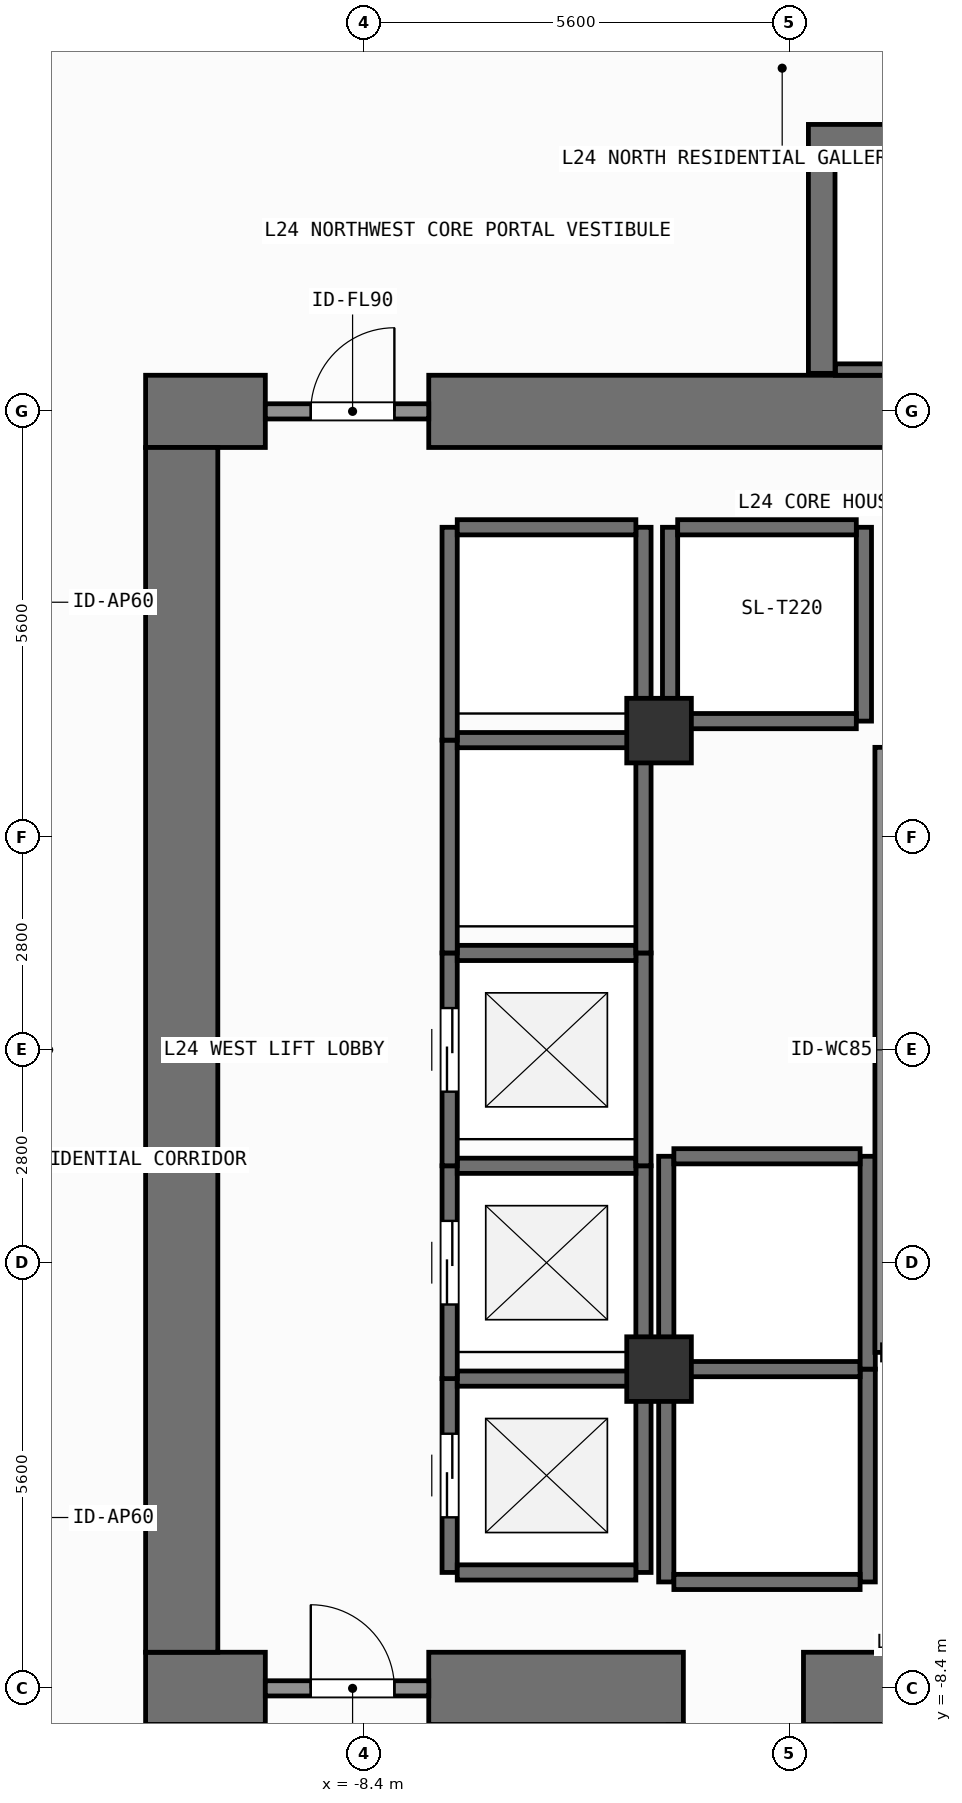
"""IFC4 building model, lengths in metres.
Left out: names, types, materials, properties, quantities, classifications, styles, units other than length and angle.
Written with IfcOpenShell. Run it as: python <this file> out.ifc"""

import sys

from ifc_helpers import new_model, si_unit, direction, frame, frame_2d, origin, origin_2d, place, context, subcontext, project, spatial, rectangle, extrude, element, fill, save


model = new_model("IFC4")
c1 = context("Model", 3, precision=1e-05, world=origin(), true_north=direction((0.0, 1.0)))
c2 = subcontext(c1, "Body", "Model", "MODEL_VIEW")
j1 = project(units=[si_unit("LENGTHUNIT", "METRE"), si_unit("PLANEANGLEUNIT", "RADIAN")], contexts=[c1])
p1 = place(None, origin())
s1 = spatial("IfcSite", under=j1, at=p1, CompositionType="ELEMENT")
p2 = place(p1, origin())
s2 = spatial("IfcBuilding", under=s1, at=p2, CompositionType="ELEMENT")
p3 = place(p2, frame((0.0, 0.0, 96.9)))
s3 = spatial("IfcBuildingStorey", under=s2, at=p3, CompositionType="ELEMENT", Elevation=96.9)
p4 = place(p3, frame((-11.275, -8.4, 0.0), z_axis=(0.0, 0.0, 1.0), x_axis=(1.0, 0.0, 0.0)))
e1 = element("IfcWall", 1, at=p4, inside=s3, PredefinedType="SHEAR", context=c2, shape_type="SweptSolid", body=[
    extrude(rectangle(XDim=1.575, YDim=0.95, at=frame_2d((0.788, 0.0))), origin(), (0.0, 0.0, 1.0), 3.9),
])
p5 = place(p3, frame((-7.55, -8.4, 0.0), z_axis=(0.0, 0.0, 1.0), x_axis=(1.0, 0.0, 0.0)))
e2 = element("IfcWall", 2, at=p5, inside=s3, PredefinedType="SHEAR", context=c2, shape_type="SweptSolid", body=[
    extrude(rectangle(XDim=3.35, YDim=0.95, at=frame_2d((1.675, 0.0))), origin(), (0.0, 0.0, 1.0), 3.9),
])
p6 = place(p3, frame((-2.62, -8.4, 0.0), z_axis=(0.0, 0.0, 1.0), x_axis=(1.0, 0.0, 0.0)))
e3 = element("IfcWall", 3, at=p6, inside=s3, PredefinedType="SHEAR", context=c2, shape_type="SweptSolid", body=[
    extrude(rectangle(XDim=7.27, YDim=0.95, at=frame_2d((3.635, 0.0))), origin(), (0.0, 0.0, 1.0), 3.9),
])
p7 = place(p3, frame((-11.275, 8.4, 0.0), z_axis=(0.0, 0.0, 1.0), x_axis=(1.0, 0.0, 0.0)))
e4 = element("IfcWall", 4, at=p7, inside=s3, PredefinedType="SHEAR", context=c2, shape_type="SweptSolid", body=[
    extrude(rectangle(XDim=1.575, YDim=0.95, at=frame_2d((0.788, 0.0))), origin(), (0.0, 0.0, 1.0), 3.9),
])
p8 = place(p3, frame((-7.55, 8.4, 0.0), z_axis=(0.0, 0.0, 1.0), x_axis=(1.0, 0.0, 0.0)))
e5 = element("IfcWall", 5, at=p8, inside=s3, PredefinedType="SHEAR", context=c2, shape_type="SweptSolid", body=[
    extrude(rectangle(XDim=16.425, YDim=0.95, at=frame_2d((8.212, 0.0))), origin(), (0.0, 0.0, 1.0), 3.9),
])
p9 = place(p3, frame((-10.8, -7.925, 0.0), z_axis=(0.0, 0.0, 1.0), x_axis=(0.0, 1.0, 0.0)))
e6 = element("IfcWall", 6, at=p9, inside=s3, PredefinedType="SHEAR", context=c2, shape_type="SweptSolid", body=[
    extrude(rectangle(XDim=15.85, YDim=0.95, at=frame_2d((7.925, 0.0))), origin(), (0.0, 0.0, 1.0), 3.9),
])
p10 = place(p3, frame((-2.555, 12.0, 0.0), z_axis=(0.0, 0.0, 1.0), x_axis=(1.0, 0.0, 0.0)))
e7 = element("IfcWall", 7, at=p10, inside=s3, PredefinedType="SHEAR", context=c2, shape_type="SweptSolid", body=[
    extrude(rectangle(XDim=7.31, YDim=0.35, at=frame_2d((3.655, 0.0))), origin(), (0.0, 0.0, 1.0), 3.9),
])
p11 = place(p3, frame((-2.2, 8.95, 0.0), z_axis=(0.0, 0.0, 1.0), x_axis=(1.0, 0.0, 0.0)))
e8 = element("IfcWall", 8, at=p11, inside=s3, PredefinedType="SHEAR", context=c2, shape_type="SweptSolid", body=[
    extrude(rectangle(XDim=6.6, YDim=0.15, at=frame_2d((3.3, 0.0))), origin(), (0.0, 0.0, 1.0), 3.9),
])
p12 = place(p3, frame((-2.38, 8.9, 0.0), z_axis=(0.0, 0.0, 1.0), x_axis=(0.0, 1.0, 0.0)))
e9 = element("IfcWall", 9, at=p12, inside=s3, PredefinedType="SHEAR", context=c2, shape_type="SweptSolid", body=[
    extrude(rectangle(XDim=2.925, YDim=0.35, at=frame_2d((1.462, 0.0))), origin(), (0.0, 0.0, 1.0), 3.9),
])
for number, where, z_axis, x_axis in (
    (10, (-4.52, -4.2, 0.0), (0.0, 0.0, 1.0), (1.0, 0.0, 0.0)),
    (11, (-4.52, 4.2, 0.0), (0.0, 0.0, 1.0), (1.0, 0.0, 0.0)),
):
    element("IfcColumn", number, at=place(p3, frame(where, z_axis=z_axis, x_axis=x_axis)), inside=s3, PredefinedType="COLUMN", context=c2, shape_type="SweptSolid", body=[
        extrude(rectangle(XDim=0.85, YDim=0.85, at=origin_2d()), origin(), (0.0, 0.0, 1.0), 3.9),
    ])
p13 = place(p3, frame((-7.275, -6.875, 0.0), z_axis=(0.0, 0.0, 1.0), x_axis=(0.0, 1.0, 0.0)))
e12 = element("IfcWall", 12, at=p13, inside=s3, PredefinedType="SHEAR", context=c2, shape_type="SweptSolid", body=[
    extrude(rectangle(XDim=2.55, YDim=0.2, at=frame_2d((1.275, 0.0))), origin(), (0.0, 0.0, 1.0), 3.68),
])
p14 = place(p13, frame((0.725, 0.0, 0.0)))
e13 = element("IfcOpeningElement", 13, at=p14, cuts=e12, PredefinedType="OPENING", context=c2, shape_type="SweptSolid", body=[
    extrude(rectangle(XDim=1.1, YDim=2.2, at=frame_2d((0.55, 1.1))), frame((0.0, 0.11, 0.0), z_axis=(0.0, -1.0, 0.0), x_axis=(1.0, 0.0, 0.0)), (0.0, 0.0, 1.0), 0.22),
])
p15 = place(p3, frame((-4.725, -6.875, 0.0), z_axis=(0.0, 0.0, 1.0), x_axis=(0.0, 1.0, 0.0)))
e14 = element("IfcWall", 14, at=p15, inside=s3, PredefinedType="SHEAR", context=c2, shape_type="SweptSolid", body=[
    extrude(rectangle(XDim=2.55, YDim=0.2, at=frame_2d((1.275, 0.0))), origin(), (0.0, 0.0, 1.0), 3.68),
])
for number, where, z_axis, x_axis in (
    (15, (-7.175, -6.875, 0.0), (0.0, 0.0, 1.0), (1.0, 0.0, 0.0)),
    (16, (-7.175, -4.325, 0.0), (0.0, 0.0, 1.0), (1.0, 0.0, 0.0)),
):
    element("IfcWall", number, at=place(p3, frame(where, z_axis=z_axis, x_axis=x_axis)), inside=s3, PredefinedType="SHEAR", context=c2, shape_type="SweptSolid", body=[
        extrude(rectangle(XDim=2.35, YDim=0.2, at=frame_2d((1.175, 0.0))), origin(), (0.0, 0.0, 1.0), 3.68),
    ])
p16 = place(p3, frame((-7.275, -4.325, 0.0), z_axis=(0.0, 0.0, 1.0), x_axis=(0.0, 1.0, 0.0)))
e17 = element("IfcWall", 17, at=p16, inside=s3, PredefinedType="SHEAR", context=c2, shape_type="SweptSolid", body=[
    extrude(rectangle(XDim=2.8, YDim=0.2, at=frame_2d((1.4, 0.0))), origin(), (0.0, 0.0, 1.0), 3.68),
])
p17 = place(p16, frame((0.975, 0.0, 0.0)))
e18 = element("IfcOpeningElement", 18, at=p17, cuts=e17, PredefinedType="OPENING", context=c2, shape_type="SweptSolid", body=[
    extrude(rectangle(XDim=1.1, YDim=2.2, at=frame_2d((0.55, 1.1))), frame((0.0, 0.11, 0.0), z_axis=(0.0, -1.0, 0.0), x_axis=(1.0, 0.0, 0.0)), (0.0, 0.0, 1.0), 0.22),
])
p18 = place(p3, frame((-4.725, -4.325, 0.0), z_axis=(0.0, 0.0, 1.0), x_axis=(0.0, 1.0, 0.0)))
e19 = element("IfcWall", 19, at=p18, inside=s3, PredefinedType="SHEAR", context=c2, shape_type="SweptSolid", body=[
    extrude(rectangle(XDim=2.8, YDim=0.2, at=frame_2d((1.4, 0.0))), origin(), (0.0, 0.0, 1.0), 3.68),
])
p19 = place(p3, frame((-7.175, -1.525, 0.0), z_axis=(0.0, 0.0, 1.0), x_axis=(1.0, 0.0, 0.0)))
e20 = element("IfcWall", 20, at=p19, inside=s3, PredefinedType="SHEAR", context=c2, shape_type="SweptSolid", body=[
    extrude(rectangle(XDim=2.35, YDim=0.2, at=frame_2d((1.175, 0.0))), origin(), (0.0, 0.0, 1.0), 3.68),
])
p20 = place(p3, frame((-7.275, -1.525, 0.0), z_axis=(0.0, 0.0, 1.0), x_axis=(0.0, 1.0, 0.0)))
e21 = element("IfcWall", 21, at=p20, inside=s3, PredefinedType="SHEAR", context=c2, shape_type="SweptSolid", body=[
    extrude(rectangle(XDim=2.8, YDim=0.2, at=frame_2d((1.4, 0.0))), origin(), (0.0, 0.0, 1.0), 3.68),
])
p21 = place(p20, frame((0.975, 0.0, 0.0)))
e22 = element("IfcOpeningElement", 22, at=p21, cuts=e21, PredefinedType="OPENING", context=c2, shape_type="SweptSolid", body=[
    extrude(rectangle(XDim=1.1, YDim=2.2, at=frame_2d((0.55, 1.1))), frame((0.0, 0.11, 0.0), z_axis=(0.0, -1.0, 0.0), x_axis=(1.0, 0.0, 0.0)), (0.0, 0.0, 1.0), 0.22),
])
p22 = place(p3, frame((-4.725, -1.525, 0.0), z_axis=(0.0, 0.0, 1.0), x_axis=(0.0, 1.0, 0.0)))
e23 = element("IfcWall", 23, at=p22, inside=s3, PredefinedType="SHEAR", context=c2, shape_type="SweptSolid", body=[
    extrude(rectangle(XDim=2.8, YDim=0.2, at=frame_2d((1.4, 0.0))), origin(), (0.0, 0.0, 1.0), 3.68),
])
p23 = place(p3, frame((-7.175, 1.275, 0.0), z_axis=(0.0, 0.0, 1.0), x_axis=(1.0, 0.0, 0.0)))
e24 = element("IfcWall", 24, at=p23, inside=s3, PredefinedType="SHEAR", context=c2, shape_type="SweptSolid", body=[
    extrude(rectangle(XDim=2.35, YDim=0.2, at=frame_2d((1.175, 0.0))), origin(), (0.0, 0.0, 1.0), 3.68),
])
for number, where, z_axis, x_axis in (
    (25, (-7.275, 1.275, 0.0), (0.0, 0.0, 1.0), (0.0, 1.0, 0.0)),
    (26, (-4.725, 1.275, 0.0), (0.0, 0.0, 1.0), (0.0, 1.0, 0.0)),
):
    element("IfcWall", number, at=place(p3, frame(where, z_axis=z_axis, x_axis=x_axis)), inside=s3, PredefinedType="SHEAR", context=c2, shape_type="SweptSolid", body=[
        extrude(rectangle(XDim=2.8, YDim=0.2, at=frame_2d((1.4, 0.0))), origin(), (0.0, 0.0, 1.0), 3.68),
    ])
p24 = place(p3, frame((-7.175, 4.075, 0.0), z_axis=(0.0, 0.0, 1.0), x_axis=(1.0, 0.0, 0.0)))
e27 = element("IfcWall", 27, at=p24, inside=s3, PredefinedType="SHEAR", context=c2, shape_type="SweptSolid", body=[
    extrude(rectangle(XDim=2.35, YDim=0.2, at=frame_2d((1.175, 0.0))), origin(), (0.0, 0.0, 1.0), 3.68),
])
for number, where, z_axis, x_axis in (
    (28, (-7.275, 4.075, 0.0), (0.0, 0.0, 1.0), (0.0, 1.0, 0.0)),
    (29, (-4.725, 4.075, 0.0), (0.0, 0.0, 1.0), (0.0, 1.0, 0.0)),
):
    element("IfcWall", number, at=place(p3, frame(where, z_axis=z_axis, x_axis=x_axis)), inside=s3, PredefinedType="SHEAR", context=c2, shape_type="SweptSolid", body=[
        extrude(rectangle(XDim=2.8, YDim=0.2, at=frame_2d((1.4, 0.0))), origin(), (0.0, 0.0, 1.0), 3.68),
    ])
p25 = place(p3, frame((-7.175, 6.875, 0.0), z_axis=(0.0, 0.0, 1.0), x_axis=(1.0, 0.0, 0.0)))
e30 = element("IfcWall", 30, at=p25, inside=s3, PredefinedType="SHEAR", context=c2, shape_type="SweptSolid", body=[
    extrude(rectangle(XDim=2.35, YDim=0.2, at=frame_2d((1.175, 0.0))), origin(), (0.0, 0.0, 1.0), 3.68),
])
for number, where, z_axis, x_axis in (
    (31, (-4.375, 4.325, 0.0), (0.0, 0.0, 1.0), (0.0, 1.0, 0.0)),
    (32, (-1.825, 4.325, 0.0), (0.0, 0.0, 1.0), (0.0, 1.0, 0.0)),
):
    element("IfcWall", number, at=place(p3, frame(where, z_axis=z_axis, x_axis=x_axis)), inside=s3, PredefinedType="SHEAR", context=c2, shape_type="SweptSolid", body=[
        extrude(rectangle(XDim=2.55, YDim=0.2, at=frame_2d((1.275, 0.0))), origin(), (0.0, 0.0, 1.0), 3.68),
    ])
for number, where, z_axis, x_axis in (
    (33, (-4.275, 4.325, 0.0), (0.0, 0.0, 1.0), (1.0, 0.0, 0.0)),
    (34, (-4.275, 6.875, 0.0), (0.0, 0.0, 1.0), (1.0, 0.0, 0.0)),
):
    element("IfcWall", number, at=place(p3, frame(where, z_axis=z_axis, x_axis=x_axis)), inside=s3, PredefinedType="SHEAR", context=c2, shape_type="SweptSolid", body=[
        extrude(rectangle(XDim=2.35, YDim=0.2, at=frame_2d((1.175, 0.0))), origin(), (0.0, 0.0, 1.0), 3.68),
    ])
for number, where, z_axis, x_axis in (
    (35, (-4.425, -7.0, 0.0), (0.0, 0.0, 1.0), (0.0, 1.0, 0.0)),
    (36, (-1.775, -7.0, 0.0), (0.0, 0.0, 1.0), (0.0, 1.0, 0.0)),
):
    element("IfcWall", number, at=place(p3, frame(where, z_axis=z_axis, x_axis=x_axis)), inside=s3, PredefinedType="SHEAR", context=c2, shape_type="SweptSolid", body=[
        extrude(rectangle(XDim=2.8, YDim=0.2, at=frame_2d((1.4, 0.0))), origin(), (0.0, 0.0, 1.0), 3.68),
    ])
for number, where, z_axis, x_axis in (
    (37, (-4.325, -7.0, 0.0), (0.0, 0.0, 1.0), (1.0, 0.0, 0.0)),
    (38, (-4.325, -4.2, 0.0), (0.0, 0.0, 1.0), (1.0, 0.0, 0.0)),
):
    element("IfcWall", number, at=place(p3, frame(where, z_axis=z_axis, x_axis=x_axis)), inside=s3, PredefinedType="SHEAR", context=c2, shape_type="SweptSolid", body=[
        extrude(rectangle(XDim=2.45, YDim=0.2, at=frame_2d((1.225, 0.0))), origin(), (0.0, 0.0, 1.0), 3.68),
    ])
for number, where, z_axis, x_axis in (
    (39, (-4.425, -4.2, 0.0), (0.0, 0.0, 1.0), (0.0, 1.0, 0.0)),
    (40, (-1.775, -4.2, 0.0), (0.0, 0.0, 1.0), (0.0, 1.0, 0.0)),
):
    element("IfcWall", number, at=place(p3, frame(where, z_axis=z_axis, x_axis=x_axis)), inside=s3, PredefinedType="SHEAR", context=c2, shape_type="SweptSolid", body=[
        extrude(rectangle(XDim=2.8, YDim=0.2, at=frame_2d((1.4, 0.0))), origin(), (0.0, 0.0, 1.0), 3.68),
    ])
p26 = place(p3, frame((-4.325, -1.4, 0.0), z_axis=(0.0, 0.0, 1.0), x_axis=(1.0, 0.0, 0.0)))
e41 = element("IfcWall", 41, at=p26, inside=s3, PredefinedType="SHEAR", context=c2, shape_type="SweptSolid", body=[
    extrude(rectangle(XDim=2.45, YDim=0.2, at=frame_2d((1.225, 0.0))), origin(), (0.0, 0.0, 1.0), 3.68),
])
p27 = place(p3, frame((-9.7, -8.4, 0.0), z_axis=(0.0, 0.0, 1.0), x_axis=(1.0, 0.0, 0.0)))
e42 = element("IfcWall", 42, at=p27, inside=s3, PredefinedType="SOLIDWALL", context=c2, shape_type="SweptSolid", body=[
    extrude(rectangle(XDim=2.15, YDim=0.2, at=frame_2d((1.075, 0.0))), origin(), (0.0, 0.0, 1.0), 2.72),
])
p28 = place(p27, frame((0.598, 0.0, 0.0)))
e43 = element("IfcOpeningElement", 43, at=p28, cuts=e42, PredefinedType="OPENING", context=c2, shape_type="SweptSolid", body=[
    extrude(rectangle(XDim=1.1, YDim=2.15, at=frame_2d((0.55, 1.075))), frame((0.0, 0.11, 0.0), z_axis=(0.0, -1.0, 0.0), x_axis=(1.0, 0.0, 0.0)), (0.0, 0.0, 1.0), 0.22),
])
p29 = place(p3, frame((-9.7, 8.4, 0.0), z_axis=(0.0, 0.0, 1.0), x_axis=(1.0, 0.0, 0.0)))
e44 = element("IfcWall", 44, at=p29, inside=s3, PredefinedType="SOLIDWALL", context=c2, shape_type="SweptSolid", body=[
    extrude(rectangle(XDim=2.15, YDim=0.2, at=frame_2d((1.075, 0.0))), origin(), (0.0, 0.0, 1.0), 2.72),
])
p30 = place(p29, frame((0.598, 0.0, 0.0)))
e45 = element("IfcOpeningElement", 45, at=p30, cuts=e44, PredefinedType="OPENING", context=c2, shape_type="SweptSolid", body=[
    extrude(rectangle(XDim=1.1, YDim=2.15, at=frame_2d((0.55, 1.075))), frame((0.0, 0.11, 0.0), z_axis=(0.0, -1.0, 0.0), x_axis=(1.0, 0.0, 0.0)), (0.0, 0.0, 1.0), 0.22),
])
p31 = place(p3, frame((-1.58, -3.98, 0.0), z_axis=(0.0, 0.0, 1.0), x_axis=(0.0, 1.0, 0.0)))
e46 = element("IfcWall", 46, at=p31, inside=s3, PredefinedType="SOLIDWALL", context=c2, shape_type="SweptSolid", body=[
    extrude(rectangle(XDim=7.96, YDim=0.2, at=frame_2d((3.98, 0.0))), origin(), (0.0, 0.0, 1.0), 3.68),
])
p32 = place(p14, origin())
e47 = element("IfcDoor", 47, at=p32, inside=s3, OperationType="SLIDING_TO_LEFT", PredefinedType="DOOR", context=c2, shape_type="SweptSolid", body=[
    extrude(rectangle(XDim=1.1, YDim=2.2, at=frame_2d((0.55, 1.1))), frame((0.0, 0.025, 0.0), z_axis=(0.0, -1.0, 0.0), x_axis=(1.0, 0.0, 0.0)), (0.0, 0.0, 1.0), 0.05),
])
fill(e13, e47)
p33 = place(p17, origin())
e48 = element("IfcDoor", 48, at=p33, inside=s3, OperationType="SLIDING_TO_LEFT", PredefinedType="DOOR", context=c2, shape_type="SweptSolid", body=[
    extrude(rectangle(XDim=1.1, YDim=2.2, at=frame_2d((0.55, 1.1))), frame((0.0, 0.025, 0.0), z_axis=(0.0, -1.0, 0.0), x_axis=(1.0, 0.0, 0.0)), (0.0, 0.0, 1.0), 0.05),
])
fill(e18, e48)
p34 = place(p21, origin())
e49 = element("IfcDoor", 49, at=p34, inside=s3, OperationType="SLIDING_TO_LEFT", PredefinedType="DOOR", context=c2, shape_type="SweptSolid", body=[
    extrude(rectangle(XDim=1.1, YDim=2.2, at=frame_2d((0.55, 1.1))), frame((0.0, 0.025, 0.0), z_axis=(0.0, -1.0, 0.0), x_axis=(1.0, 0.0, 0.0)), (0.0, 0.0, 1.0), 0.05),
])
fill(e22, e49)
p35 = place(p28, origin())
e50 = element("IfcDoor", 50, at=p35, inside=s3, OperationType="SINGLE_SWING_LEFT", PredefinedType="DOOR", context=c2, shape_type="SweptSolid", body=[
    extrude(rectangle(XDim=1.1, YDim=2.15, at=frame_2d((0.55, 1.075))), frame((0.0, 0.025, 0.0), z_axis=(0.0, -1.0, 0.0), x_axis=(1.0, 0.0, 0.0)), (0.0, 0.0, 1.0), 0.05),
])
fill(e43, e50)
p36 = place(p30, origin())
e51 = element("IfcDoor", 51, at=p36, inside=s3, OperationType="SINGLE_SWING_RIGHT", PredefinedType="DOOR", context=c2, shape_type="SweptSolid", body=[
    extrude(rectangle(XDim=1.1, YDim=2.15, at=frame_2d((0.55, 1.075))), frame((0.0, 0.025, 0.0), z_axis=(0.0, -1.0, 0.0), x_axis=(1.0, 0.0, 0.0)), (0.0, 0.0, 1.0), 0.05),
])
fill(e45, e51)
save(model, sys.argv[1])
